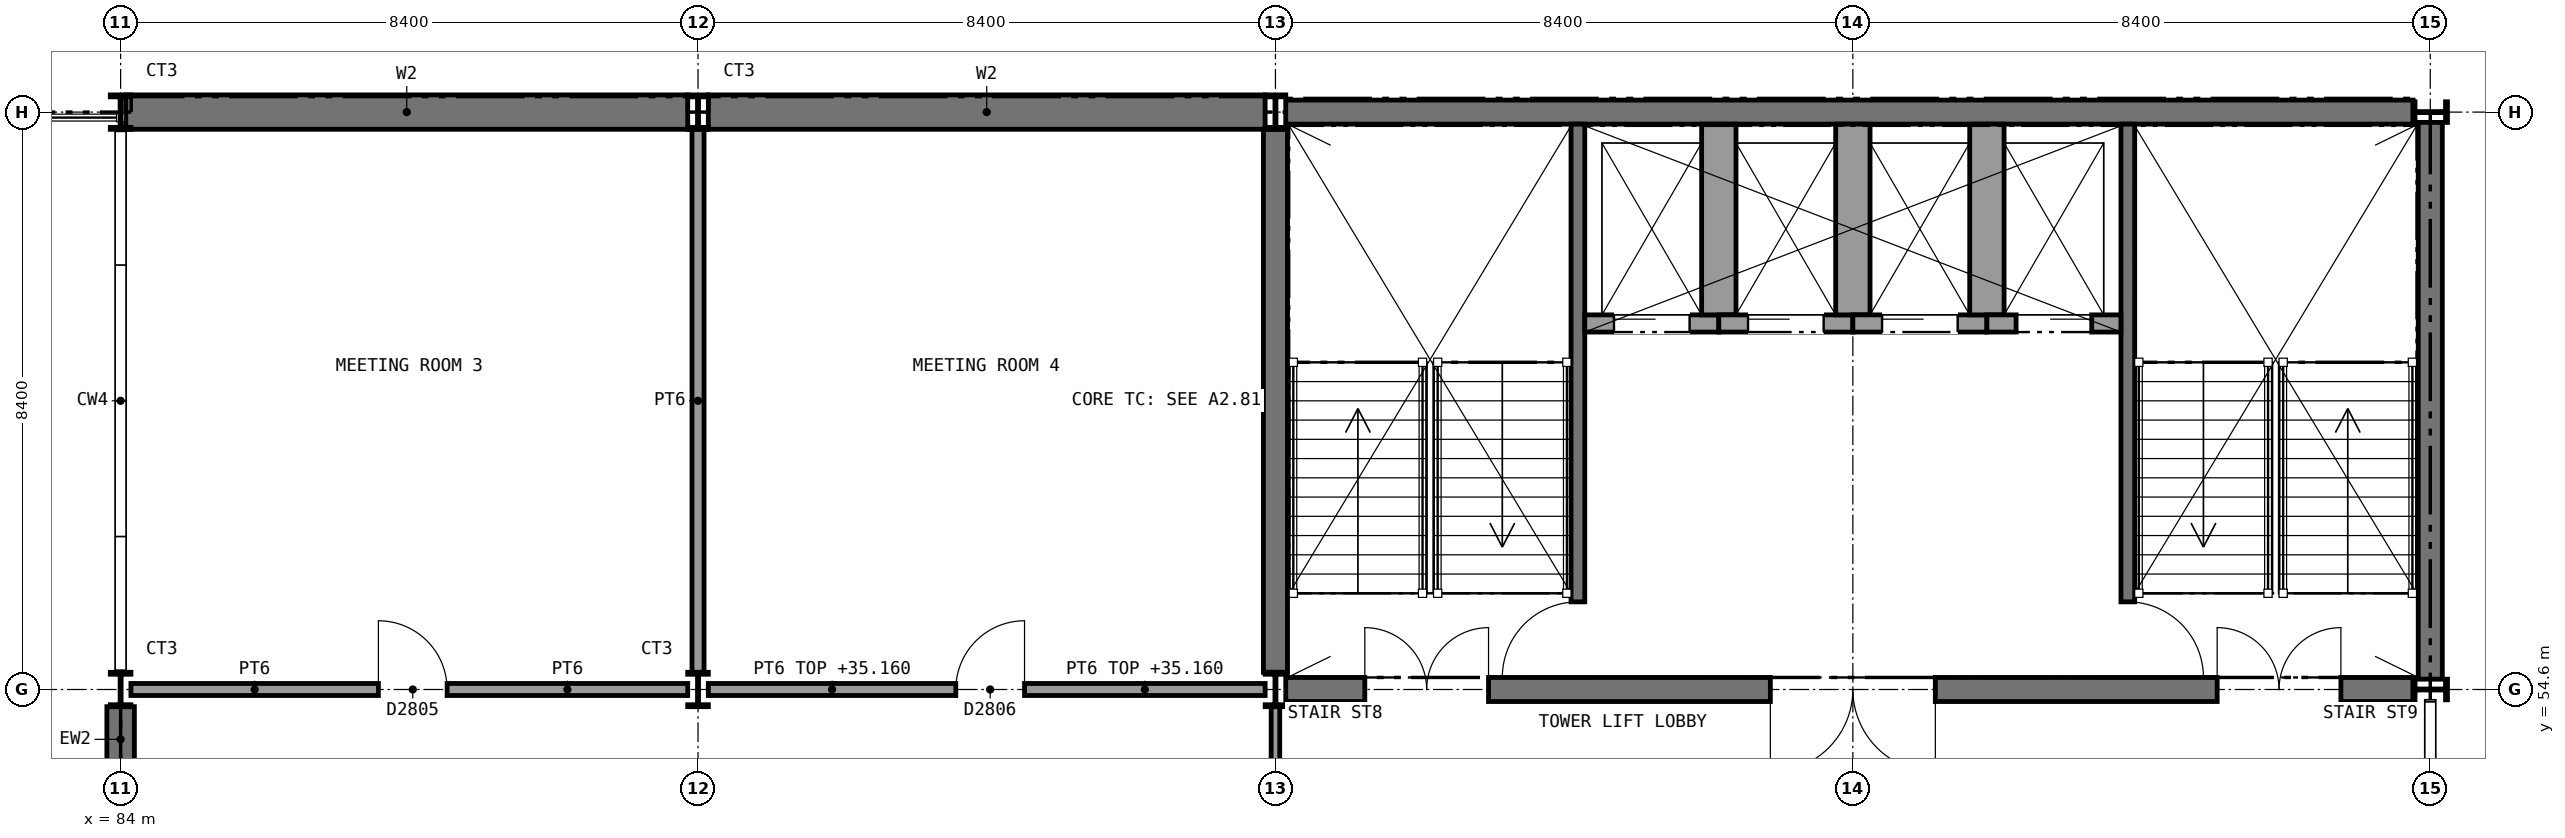
"""IFC4 building model, lengths in metres.
Left out: names, types, materials, properties, quantities, classifications, styles, units other than length and angle.
Written with IfcOpenShell. Run it as: python <this file> out.ifc"""

import sys

from ifc_helpers import new_model, si_unit, direction, frame, frame_2d, origin, origin_2d, place, context, subcontext, project, spatial, rectangle, i_section, extrude, element, fill, save


model = new_model("IFC4")
c1 = context("Model", 3, precision=1e-05, world=origin(), true_north=direction((0.0, 1.0)))
c2 = subcontext(c1, "Body", "Model", "MODEL_VIEW")
j1 = project(units=[si_unit("LENGTHUNIT", "METRE"), si_unit("PLANEANGLEUNIT", "RADIAN")], contexts=[c1])
p1 = place(None, origin())
s1 = spatial("IfcSite", under=j1, at=p1, CompositionType="ELEMENT")
p2 = place(p1, origin())
s2 = spatial("IfcBuilding", under=s1, at=p2, CompositionType="ELEMENT")
p3 = place(p2, frame((0.0, 0.0, 31.2)))
s3 = spatial("IfcBuildingStorey", under=s2, at=p3, CompositionType="ELEMENT", Elevation=31.2)
p4 = place(p3, frame((84.075, 63.0, 0.0), z_axis=(0.0, 0.0, 1.0), x_axis=(1.0, 0.0, 0.0)))
e1 = element("IfcWall", 1, at=p4, inside=s3, PredefinedType="SHEAR", context=c2, shape_type="SweptSolid", body=[
    extrude(rectangle(XDim=8.175, YDim=0.5, at=frame_2d((4.087, 0.0))), origin(), (0.0, 0.0, 1.0), 4.25),
])
p5 = place(p3, frame((92.55, 63.0, 0.0), z_axis=(0.0, 0.0, 1.0), x_axis=(1.0, 0.0, 0.0)))
e2 = element("IfcWall", 2, at=p5, inside=s3, PredefinedType="SHEAR", context=c2, shape_type="SweptSolid", body=[
    extrude(rectangle(XDim=8.1, YDim=0.5, at=frame_2d((4.05, 0.0))), origin(), (0.0, 0.0, 1.0), 4.25),
])
p6 = place(p3, frame((100.95, 63.0, 0.0), z_axis=(0.0, 0.0, 1.0), x_axis=(1.0, 0.0, 0.0)))
e3 = element("IfcWall", 3, at=p6, inside=s3, PredefinedType="SHEAR", context=c2, shape_type="SweptSolid", body=[
    extrude(rectangle(XDim=16.4, YDim=0.35, at=frame_2d((8.2, 0.0))), origin(), (0.0, 0.0, 1.0), 4.25),
])
p7 = place(p3, frame((100.95, 54.6, 0.0), z_axis=(0.0, 0.0, 1.0), x_axis=(1.0, 0.0, 0.0)))
e4 = element("IfcWall", 4, at=p7, inside=s3, PredefinedType="SHEAR", context=c2, shape_type="SweptSolid", body=[
    extrude(rectangle(XDim=16.4, YDim=0.35, at=frame_2d((8.2, 0.0))), origin(), (0.0, 0.0, 1.0), 4.25),
])
p8 = place(p7, frame((1.15, 0.0, 0.0)))
e5 = element("IfcOpeningElement", 5, at=p8, cuts=e4, PredefinedType="OPENING", context=c2, shape_type="SweptSolid", body=[
    extrude(rectangle(XDim=1.8, YDim=2.1, at=frame_2d((0.9, 1.05))), frame((0.0, 0.185, 0.0), z_axis=(0.0, -1.0, 0.0), x_axis=(1.0, 0.0, 0.0)), (0.0, 0.0, 1.0), 0.37),
])
p9 = place(p7, frame((13.55, 0.0, 0.0)))
e6 = element("IfcOpeningElement", 6, at=p9, cuts=e4, PredefinedType="OPENING", context=c2, shape_type="SweptSolid", body=[
    extrude(rectangle(XDim=1.8, YDim=2.1, at=frame_2d((0.9, 1.05))), frame((0.0, 0.185, 0.0), z_axis=(0.0, -1.0, 0.0), x_axis=(1.0, 0.0, 0.0)), (0.0, 0.0, 1.0), 0.37),
])
p10 = place(p7, frame((7.05, 0.0, 0.0)))
e7 = element("IfcOpeningElement", 7, at=p10, cuts=e4, PredefinedType="OPENING", context=c2, shape_type="SweptSolid", body=[
    extrude(rectangle(XDim=2.4, YDim=2.4, at=frame_2d((1.2, 1.2))), frame((0.0, 0.185, 0.0), z_axis=(0.0, -1.0, 0.0), x_axis=(1.0, 0.0, 0.0)), (0.0, 0.0, 1.0), 0.37),
])
p11 = place(p3, frame((100.8, 54.85, 0.0), z_axis=(0.0, 0.0, 1.0), x_axis=(0.0, 1.0, 0.0)))
e8 = element("IfcWall", 8, at=p11, inside=s3, PredefinedType="SHEAR", context=c2, shape_type="SweptSolid", body=[
    extrude(rectangle(XDim=7.9, YDim=0.35, at=frame_2d((3.95, 0.0))), origin(), (0.0, 0.0, 1.0), 4.25),
])
p12 = place(p3, frame((117.6, 54.75, 0.0), z_axis=(0.0, 0.0, 1.0), x_axis=(0.0, 1.0, 0.0)))
e9 = element("IfcWall", 9, at=p12, inside=s3, PredefinedType="SHEAR", context=c2, shape_type="SweptSolid", body=[
    extrude(rectangle(XDim=8.1, YDim=0.35, at=frame_2d((4.05, 0.0))), origin(), (0.0, 0.0, 1.0), 4.25),
])
for number, where, z_axis, x_axis in (
    (10, (84.0, 54.6, 0.0), (0.0, 0.0, 1.0), (1.0, 0.0, 0.0)),
    (11, (84.0, 63.0, 0.0), (0.0, 0.0, 1.0), (1.0, 0.0, 0.0)),
    (12, (92.4, 54.6, 0.0), (0.0, 0.0, 1.0), (1.0, 0.0, 0.0)),
    (13, (92.4, 63.0, 0.0), (0.0, 0.0, 1.0), (1.0, 0.0, 0.0)),
    (14, (100.8, 54.6, 0.0), (0.0, 0.0, 1.0), (1.0, 0.0, 0.0)),
    (15, (100.8, 63.0, 0.0), (0.0, 0.0, 1.0), (1.0, 0.0, 0.0)),
    (16, (117.6, 54.6, 0.0), (0.0, 0.0, 1.0), (0.0, 1.0, 0.0)),
    (17, (117.6, 63.0, 0.0), (0.0, 0.0, 1.0), (0.0, 1.0, 0.0)),
):
    element("IfcColumn", number, at=place(p3, frame(where, z_axis=z_axis, x_axis=x_axis)), inside=s3, PredefinedType="COLUMN", context=c2, shape_type="SweptSolid", body=[
        extrude(i_section(OverallWidth=0.3, OverallDepth=0.5, WebThickness=0.014, FlangeThickness=0.028, FilletRadius=0.027, at=origin_2d()), origin(), (0.0, 0.0, 1.0), 4.4),
    ])
p13 = place(p3, frame((100.8, 51.35, 0.0), z_axis=(0.0, 0.0, 1.0), x_axis=(0.0, 1.0, 0.0)))
e18 = element("IfcWall", 18, at=p13, inside=s3, PredefinedType="PARTITIONING", context=c2, shape_type="SweptSolid", body=[
    extrude(rectangle(XDim=3.0, YDim=0.125, at=frame_2d((1.5, 0.0))), origin(), (0.0, 0.0, 1.0), 3.9),
])
p14 = place(p3, frame((84.15, 54.6, 0.0), z_axis=(0.0, 0.0, 1.0), x_axis=(1.0, 0.0, 0.0)))
e19 = element("IfcWall", 19, at=p14, inside=s3, PredefinedType="PARTITIONING", context=c2, shape_type="SweptSolid", body=[
    extrude(rectangle(XDim=8.1, YDim=0.175, at=frame_2d((4.05, 0.0))), origin(), (0.0, 0.0, 1.0), 3.9),
])
p15 = place(p14, frame((3.6, 0.0, 0.0)))
e20 = element("IfcOpeningElement", 20, at=p15, cuts=e19, PredefinedType="OPENING", context=c2, shape_type="SweptSolid", body=[
    extrude(rectangle(XDim=1.0, YDim=2.1, at=frame_2d((0.5, 1.05))), frame((0.0, 0.098, 0.0), z_axis=(0.0, -1.0, 0.0), x_axis=(1.0, 0.0, 0.0)), (0.0, 0.0, 1.0), 0.195),
])
p16 = place(p3, frame((92.55, 54.6, 0.0), z_axis=(0.0, 0.0, 1.0), x_axis=(1.0, 0.0, 0.0)))
e21 = element("IfcWall", 21, at=p16, inside=s3, PredefinedType="PARTITIONING", context=c2, shape_type="SweptSolid", body=[
    extrude(rectangle(XDim=8.1, YDim=0.175, at=frame_2d((4.05, 0.0))), origin(), (0.0, 0.0, 1.0), 3.96),
])
p17 = place(p16, frame((3.6, 0.0, 0.0)))
e22 = element("IfcOpeningElement", 22, at=p17, cuts=e21, PredefinedType="OPENING", context=c2, shape_type="SweptSolid", body=[
    extrude(rectangle(XDim=1.0, YDim=2.1, at=frame_2d((0.5, 1.05))), frame((0.0, 0.098, 0.0), z_axis=(0.0, -1.0, 0.0), x_axis=(1.0, 0.0, 0.0)), (0.0, 0.0, 1.0), 0.195),
])
p18 = place(p3, frame((92.4, 54.85, 0.0), z_axis=(0.0, 0.0, 1.0), x_axis=(0.0, 1.0, 0.0)))
e23 = element("IfcWall", 23, at=p18, inside=s3, PredefinedType="PARTITIONING", context=c2, shape_type="SweptSolid", body=[
    extrude(rectangle(XDim=7.9, YDim=0.175, at=frame_2d((3.95, 0.0))), origin(), (0.0, 0.0, 1.0), 3.9),
])
p19 = place(p3, frame((84.0, 46.45, 0.0), z_axis=(0.0, 0.0, 1.0), x_axis=(0.0, 1.0, 0.0)))
e24 = element("IfcWall", 24, at=p19, inside=s3, PredefinedType="STANDARD", context=c2, shape_type="SweptSolid", body=[
    extrude(rectangle(XDim=7.9, YDim=0.4, at=frame_2d((3.95, 0.0))), origin(), (0.0, 0.0, 1.0), 4.25),
])
p20 = place(p19, frame((5.15, 0.0, 0.9)))
e25 = element("IfcOpeningElement", 25, at=p20, cuts=e24, PredefinedType="OPENING", context=c2, shape_type="SweptSolid", body=[
    extrude(rectangle(XDim=1.8, YDim=2.4, at=frame_2d((0.9, 1.2))), frame((0.0, 0.21, 0.0), z_axis=(0.0, -1.0, 0.0), x_axis=(1.0, 0.0, 0.0)), (0.0, 0.0, 1.0), 0.42),
])
p21 = place(p19, frame((3.05, 0.0, 0.0)))
e26 = element("IfcOpeningElement", 26, at=p21, cuts=e24, PredefinedType="OPENING", context=c2, shape_type="SweptSolid", body=[
    extrude(rectangle(XDim=1.8, YDim=2.4, at=frame_2d((0.9, 1.2))), frame((0.0, 0.21, 0.0), z_axis=(0.0, -1.0, 0.0), x_axis=(1.0, 0.0, 0.0)), (0.0, 0.0, 1.0), 0.42),
])
p22 = place(p3, frame((105.2, 62.825, 0.0), z_axis=(0.0, 0.0, 1.0), x_axis=(0.0, -1.0, 0.0)))
e27 = element("IfcWall", 27, at=p22, inside=s3, PredefinedType="SHEAR", context=c2, shape_type="SweptSolid", body=[
    extrude(rectangle(XDim=8.05, YDim=0.2, at=frame_2d((4.025, 0.0))), origin(), (0.0, 0.0, 1.0), 4.25),
])
p23 = place(p22, frame((6.95, 0.0, 0.0)))
e28 = element("IfcOpeningElement", 28, at=p23, cuts=e27, PredefinedType="OPENING", context=c2, shape_type="SweptSolid", body=[
    extrude(rectangle(XDim=1.11, YDim=2.1, at=frame_2d((0.555, 1.05))), frame((0.0, 0.11, 0.0), z_axis=(0.0, -1.0, 0.0), x_axis=(1.0, 0.0, 0.0)), (0.0, 0.0, 1.0), 0.22),
])
p24 = place(p3, frame((113.2, 62.825, 0.0), z_axis=(0.0, 0.0, 1.0), x_axis=(0.0, -1.0, 0.0)))
e29 = element("IfcWall", 29, at=p24, inside=s3, PredefinedType="SHEAR", context=c2, shape_type="SweptSolid", body=[
    extrude(rectangle(XDim=8.05, YDim=0.2, at=frame_2d((4.025, 0.0))), origin(), (0.0, 0.0, 1.0), 4.25),
])
p25 = place(p24, frame((6.95, 0.0, 0.0)))
e30 = element("IfcOpeningElement", 30, at=p25, cuts=e29, PredefinedType="OPENING", context=c2, shape_type="SweptSolid", body=[
    extrude(rectangle(XDim=1.11, YDim=2.1, at=frame_2d((0.555, 1.05))), frame((0.0, 0.11, 0.0), z_axis=(0.0, -1.0, 0.0), x_axis=(1.0, 0.0, 0.0)), (0.0, 0.0, 1.0), 0.22),
])
p26 = place(p3, frame((105.3, 59.925, 0.0), z_axis=(0.0, 0.0, 1.0), x_axis=(1.0, 0.0, 0.0)))
e31 = element("IfcWall", 31, at=p26, inside=s3, PredefinedType="SOLIDWALL", context=c2, shape_type="SweptSolid", body=[
    extrude(rectangle(XDim=1.95, YDim=0.25, at=frame_2d((0.975, 0.0))), origin(), (0.0, 0.0, 1.0), 4.4),
])
p27 = place(p26, frame((0.425, 0.0, 0.0)))
e32 = element("IfcOpeningElement", 32, at=p27, cuts=e31, PredefinedType="OPENING", context=c2, shape_type="SweptSolid", body=[
    extrude(rectangle(XDim=1.1, YDim=2.1, at=frame_2d((0.55, 1.05))), frame((0.0, 0.135, 0.0), z_axis=(0.0, -1.0, 0.0), x_axis=(1.0, 0.0, 0.0)), (0.0, 0.0, 1.0), 0.27),
])
p28 = place(p3, frame((107.25, 62.825, 0.0), z_axis=(0.0, 0.0, 1.0), x_axis=(0.0, -1.0, 0.0)))
e33 = element("IfcWall", 33, at=p28, inside=s3, PredefinedType="SOLIDWALL", context=c2, shape_type="SweptSolid", body=[
    extrude(rectangle(XDim=2.775, YDim=0.5, at=frame_2d((1.387, 0.0))), origin(), (0.0, 0.0, 1.0), 4.4),
])
p29 = place(p3, frame((107.25, 59.925, 0.0), z_axis=(0.0, 0.0, 1.0), x_axis=(1.0, 0.0, 0.0)))
e34 = element("IfcWall", 34, at=p29, inside=s3, PredefinedType="SOLIDWALL", context=c2, shape_type="SweptSolid", body=[
    extrude(rectangle(XDim=1.95, YDim=0.25, at=frame_2d((0.975, 0.0))), origin(), (0.0, 0.0, 1.0), 4.4),
])
p30 = place(p29, frame((0.425, 0.0, 0.0)))
e35 = element("IfcOpeningElement", 35, at=p30, cuts=e34, PredefinedType="OPENING", context=c2, shape_type="SweptSolid", body=[
    extrude(rectangle(XDim=1.1, YDim=2.1, at=frame_2d((0.55, 1.05))), frame((0.0, 0.135, 0.0), z_axis=(0.0, -1.0, 0.0), x_axis=(1.0, 0.0, 0.0)), (0.0, 0.0, 1.0), 0.27),
])
p31 = place(p3, frame((109.2, 62.825, 0.0), z_axis=(0.0, 0.0, 1.0), x_axis=(0.0, -1.0, 0.0)))
e36 = element("IfcWall", 36, at=p31, inside=s3, PredefinedType="SOLIDWALL", context=c2, shape_type="SweptSolid", body=[
    extrude(rectangle(XDim=2.775, YDim=0.5, at=frame_2d((1.387, 0.0))), origin(), (0.0, 0.0, 1.0), 4.4),
])
p32 = place(p3, frame((109.2, 59.925, 0.0), z_axis=(0.0, 0.0, 1.0), x_axis=(1.0, 0.0, 0.0)))
e37 = element("IfcWall", 37, at=p32, inside=s3, PredefinedType="SOLIDWALL", context=c2, shape_type="SweptSolid", body=[
    extrude(rectangle(XDim=1.95, YDim=0.25, at=frame_2d((0.975, 0.0))), origin(), (0.0, 0.0, 1.0), 4.4),
])
p33 = place(p32, frame((0.425, 0.0, 0.0)))
e38 = element("IfcOpeningElement", 38, at=p33, cuts=e37, PredefinedType="OPENING", context=c2, shape_type="SweptSolid", body=[
    extrude(rectangle(XDim=1.1, YDim=2.1, at=frame_2d((0.55, 1.05))), frame((0.0, 0.135, 0.0), z_axis=(0.0, -1.0, 0.0), x_axis=(1.0, 0.0, 0.0)), (0.0, 0.0, 1.0), 0.27),
])
p34 = place(p3, frame((111.15, 62.825, 0.0), z_axis=(0.0, 0.0, 1.0), x_axis=(0.0, -1.0, 0.0)))
e39 = element("IfcWall", 39, at=p34, inside=s3, PredefinedType="SOLIDWALL", context=c2, shape_type="SweptSolid", body=[
    extrude(rectangle(XDim=2.775, YDim=0.5, at=frame_2d((1.387, 0.0))), origin(), (0.0, 0.0, 1.0), 4.4),
])
p35 = place(p3, frame((111.15, 59.925, 0.0), z_axis=(0.0, 0.0, 1.0), x_axis=(1.0, 0.0, 0.0)))
e40 = element("IfcWall", 40, at=p35, inside=s3, PredefinedType="SOLIDWALL", context=c2, shape_type="SweptSolid", body=[
    extrude(rectangle(XDim=1.95, YDim=0.25, at=frame_2d((0.975, 0.0))), origin(), (0.0, 0.0, 1.0), 4.4),
])
p36 = place(p35, frame((0.425, 0.0, 0.0)))
e41 = element("IfcOpeningElement", 41, at=p36, cuts=e40, PredefinedType="OPENING", context=c2, shape_type="SweptSolid", body=[
    extrude(rectangle(XDim=1.1, YDim=2.1, at=frame_2d((0.55, 1.05))), frame((0.0, 0.135, 0.0), z_axis=(0.0, -1.0, 0.0), x_axis=(1.0, 0.0, 0.0)), (0.0, 0.0, 1.0), 0.27),
])
p37 = place(p15, origin())
e42 = element("IfcDoor", 42, at=p37, inside=s3, OperationType="SINGLE_SWING_LEFT", PredefinedType="DOOR", context=c2, shape_type="SweptSolid", body=[
    extrude(rectangle(XDim=1.0, YDim=2.1, at=frame_2d((0.5, 1.05))), frame((0.0, 0.025, 0.0), z_axis=(0.0, -1.0, 0.0), x_axis=(1.0, 0.0, 0.0)), (0.0, 0.0, 1.0), 0.05),
])
fill(e20, e42)
p38 = place(p17, origin())
e43 = element("IfcDoor", 43, at=p38, inside=s3, OperationType="SINGLE_SWING_RIGHT", PredefinedType="DOOR", context=c2, shape_type="SweptSolid", body=[
    extrude(rectangle(XDim=1.0, YDim=2.1, at=frame_2d((0.5, 1.05))), frame((0.0, 0.025, 0.0), z_axis=(0.0, -1.0, 0.0), x_axis=(1.0, 0.0, 0.0)), (0.0, 0.0, 1.0), 0.05),
])
fill(e22, e43)
p39 = place(p23, frame((1.1, 0.0, 0.0), z_axis=(0.0, 0.0, 1.0), x_axis=(-1.0, 0.0, 0.0)))
e44 = element("IfcDoor", 44, at=p39, inside=s3, OperationType="SINGLE_SWING_LEFT", PredefinedType="DOOR", context=c2, shape_type="SweptSolid", body=[
    extrude(rectangle(XDim=1.1, YDim=2.1, at=frame_2d((0.55, 1.05))), frame((0.0, 0.025, 0.0), z_axis=(0.0, -1.0, 0.0), x_axis=(1.0, 0.0, 0.0)), (0.0, 0.0, 1.0), 0.05),
])
fill(e28, e44)
p40 = place(p25, origin())
e45 = element("IfcDoor", 45, at=p40, inside=s3, OperationType="SINGLE_SWING_RIGHT", PredefinedType="DOOR", context=c2, shape_type="SweptSolid", body=[
    extrude(rectangle(XDim=1.1, YDim=2.1, at=frame_2d((0.55, 1.05))), frame((0.0, 0.025, 0.0), z_axis=(0.0, -1.0, 0.0), x_axis=(1.0, 0.0, 0.0)), (0.0, 0.0, 1.0), 0.05),
])
fill(e30, e45)
p41 = place(p27, frame((1.1, 0.0, 0.0), z_axis=(0.0, 0.0, 1.0), x_axis=(-1.0, 0.0, 0.0)))
e46 = element("IfcDoor", 46, at=p41, inside=s3, OperationType="SLIDING_TO_RIGHT", PredefinedType="DOOR", context=c2, shape_type="SweptSolid", body=[
    extrude(rectangle(XDim=1.1, YDim=2.1, at=frame_2d((0.55, 1.05))), frame((0.0, 0.025, 0.0), z_axis=(0.0, -1.0, 0.0), x_axis=(1.0, 0.0, 0.0)), (0.0, 0.0, 1.0), 0.05),
])
fill(e32, e46)
p42 = place(p30, frame((1.1, 0.0, 0.0), z_axis=(0.0, 0.0, 1.0), x_axis=(-1.0, 0.0, 0.0)))
e47 = element("IfcDoor", 47, at=p42, inside=s3, OperationType="SLIDING_TO_RIGHT", PredefinedType="DOOR", context=c2, shape_type="SweptSolid", body=[
    extrude(rectangle(XDim=1.1, YDim=2.1, at=frame_2d((0.55, 1.05))), frame((0.0, 0.025, 0.0), z_axis=(0.0, -1.0, 0.0), x_axis=(1.0, 0.0, 0.0)), (0.0, 0.0, 1.0), 0.05),
])
fill(e35, e47)
p43 = place(p33, frame((1.1, 0.0, 0.0), z_axis=(0.0, 0.0, 1.0), x_axis=(-1.0, 0.0, 0.0)))
e48 = element("IfcDoor", 48, at=p43, inside=s3, OperationType="SLIDING_TO_RIGHT", PredefinedType="DOOR", context=c2, shape_type="SweptSolid", body=[
    extrude(rectangle(XDim=1.1, YDim=2.1, at=frame_2d((0.55, 1.05))), frame((0.0, 0.025, 0.0), z_axis=(0.0, -1.0, 0.0), x_axis=(1.0, 0.0, 0.0)), (0.0, 0.0, 1.0), 0.05),
])
fill(e38, e48)
p44 = place(p36, frame((1.1, 0.0, 0.0), z_axis=(0.0, 0.0, 1.0), x_axis=(-1.0, 0.0, 0.0)))
e49 = element("IfcDoor", 49, at=p44, inside=s3, OperationType="SLIDING_TO_LEFT", PredefinedType="DOOR", context=c2, shape_type="SweptSolid", body=[
    extrude(rectangle(XDim=1.1, YDim=2.1, at=frame_2d((0.55, 1.05))), frame((0.0, 0.025, 0.0), z_axis=(0.0, -1.0, 0.0), x_axis=(1.0, 0.0, 0.0)), (0.0, 0.0, 1.0), 0.05),
])
fill(e41, e49)
p45 = place(p8, origin())
e50 = element("IfcDoor", 50, at=p45, inside=s3, OperationType="DOUBLE_DOOR_SINGLE_SWING", PredefinedType="DOOR", context=c2, shape_type="SweptSolid", body=[
    extrude(rectangle(XDim=1.8, YDim=2.1, at=frame_2d((0.9, 1.05))), frame((0.0, 0.025, 0.0), z_axis=(0.0, -1.0, 0.0), x_axis=(1.0, 0.0, 0.0)), (0.0, 0.0, 1.0), 0.05),
])
fill(e5, e50)
p46 = place(p9, origin())
e51 = element("IfcDoor", 51, at=p46, inside=s3, OperationType="DOUBLE_DOOR_SINGLE_SWING", PredefinedType="DOOR", context=c2, shape_type="SweptSolid", body=[
    extrude(rectangle(XDim=1.8, YDim=2.1, at=frame_2d((0.9, 1.05))), frame((0.0, 0.025, 0.0), z_axis=(0.0, -1.0, 0.0), x_axis=(1.0, 0.0, 0.0)), (0.0, 0.0, 1.0), 0.05),
])
fill(e6, e51)
p47 = place(p10, frame((2.4, 0.0, 0.0), z_axis=(0.0, 0.0, 1.0), x_axis=(-1.0, 0.0, 0.0)))
e52 = element("IfcDoor", 52, at=p47, inside=s3, OperationType="DOUBLE_DOOR_SINGLE_SWING", PredefinedType="DOOR", context=c2, shape_type="SweptSolid", body=[
    extrude(rectangle(XDim=2.4, YDim=2.4, at=frame_2d((1.2, 1.2))), frame((0.0, 0.025, 0.0), z_axis=(0.0, -1.0, 0.0), x_axis=(1.0, 0.0, 0.0)), (0.0, 0.0, 1.0), 0.05),
])
fill(e7, e52)
save(model, sys.argv[1])
